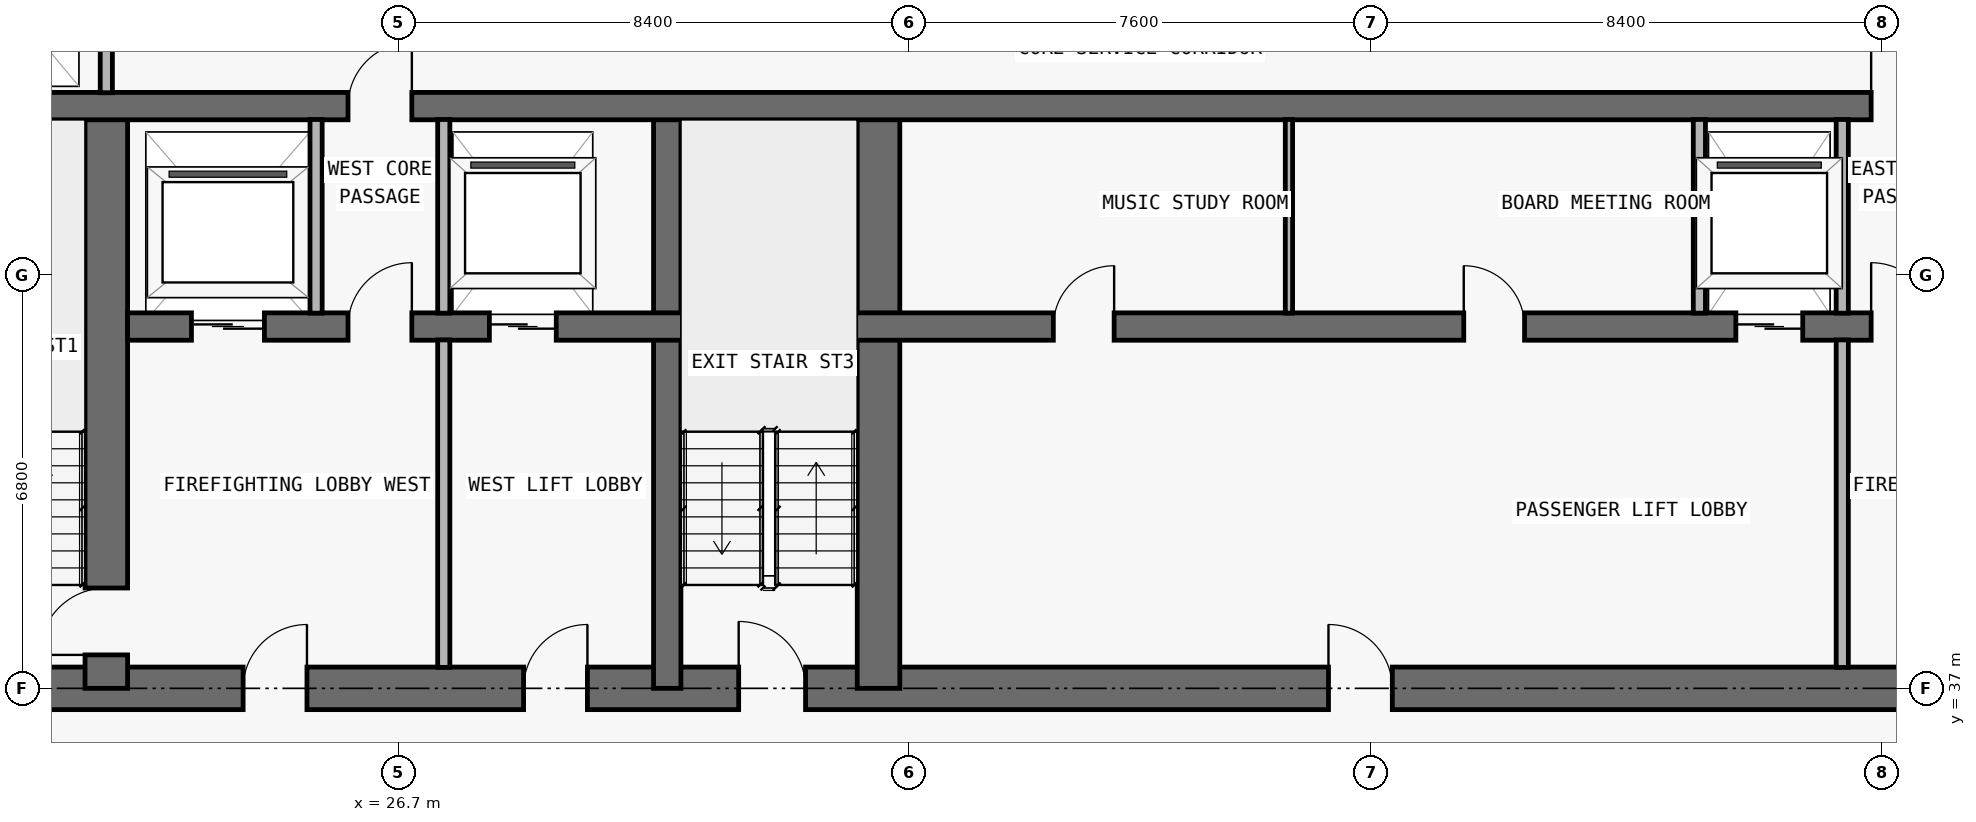
"""IFC4 building model, lengths in metres.
Left out: names, types, materials, properties, quantities, classifications, styles, units other than length and angle.
Written with IfcOpenShell. Run it as: python <this file> out.ifc"""

import sys

from ifc_helpers import new_model, si_unit, direction, frame, frame_2d, origin, place, context, subcontext, project, spatial, rectangle, extrude, element, fill, save


model = new_model("IFC4")
c1 = context("Model", 3, precision=1e-05, world=origin(), true_north=direction((0.0, 1.0)))
c2 = subcontext(c1, "Body", "Model", "MODEL_VIEW")
j1 = project(units=[si_unit("LENGTHUNIT", "METRE"), si_unit("PLANEANGLEUNIT", "RADIAN")], contexts=[c1])
p1 = place(None, origin())
s1 = spatial("IfcSite", under=j1, at=p1, CompositionType="ELEMENT")
p2 = place(p1, origin())
s2 = spatial("IfcBuilding", under=s1, at=p2, CompositionType="ELEMENT")
p3 = place(p2, frame((0.0, 0.0, 188.4)))
s3 = spatial("IfcBuildingStorey", under=s2, at=p3, CompositionType="ELEMENT", Elevation=188.4)
p4 = place(p3, frame((17.95, 37.0, 0.0), z_axis=(0.0, 0.0, 1.0), x_axis=(1.0, 0.0, 0.0)))
e1 = element("IfcWall", 1, at=p4, inside=s3, PredefinedType="SHEAR", context=c2, shape_type="SweptSolid", body=[
    extrude(rectangle(XDim=41.9, YDim=0.7, at=frame_2d((20.95, 0.0))), origin(), (0.0, 0.0, 1.0), 3.05),
])
p5 = place(p4, frame((14.35, 0.0, 0.0)))
e2 = element("IfcOpeningElement", 2, at=p5, cuts=e1, PredefinedType="OPENING", context=c2, shape_type="SweptSolid", body=[
    extrude(rectangle(XDim=1.1, YDim=2.15, at=frame_2d((0.55, 1.075))), frame((0.0, 0.36, 0.0), z_axis=(0.0, -1.0, 0.0), x_axis=(1.0, 0.0, 0.0)), (0.0, 0.0, 1.0), 0.72),
])
p6 = place(p4, frame((6.2, 0.0, 0.0)))
e3 = element("IfcOpeningElement", 3, at=p6, cuts=e1, PredefinedType="OPENING", context=c2, shape_type="SweptSolid", body=[
    extrude(rectangle(XDim=1.05, YDim=2.15, at=frame_2d((0.525, 1.075))), frame((0.0, 0.36, 0.0), z_axis=(0.0, -1.0, 0.0), x_axis=(1.0, 0.0, 0.0)), (0.0, 0.0, 1.0), 0.72),
])
p7 = place(p4, frame((34.7, 0.0, 0.0)))
e4 = element("IfcOpeningElement", 4, at=p7, cuts=e1, PredefinedType="OPENING", context=c2, shape_type="SweptSolid", body=[
    extrude(rectangle(XDim=1.05, YDim=2.15, at=frame_2d((0.525, 1.075))), frame((0.0, 0.36, 0.0), z_axis=(0.0, -1.0, 0.0), x_axis=(1.0, 0.0, 0.0)), (0.0, 0.0, 1.0), 0.72),
])
p8 = place(p4, frame((10.812, 0.0, 0.0)))
e5 = element("IfcOpeningElement", 5, at=p8, cuts=e1, PredefinedType="OPENING", context=c2, shape_type="SweptSolid", body=[
    extrude(rectangle(XDim=1.05, YDim=2.15, at=frame_2d((0.525, 1.075))), frame((0.0, 0.36, 0.0), z_axis=(0.0, -1.0, 0.0), x_axis=(1.0, 0.0, 0.0)), (0.0, 0.0, 1.0), 0.72),
])
p9 = place(p4, frame((24.05, 0.0, 0.0)))
e6 = element("IfcOpeningElement", 6, at=p9, cuts=e1, PredefinedType="OPENING", context=c2, shape_type="SweptSolid", body=[
    extrude(rectangle(XDim=1.05, YDim=2.15, at=frame_2d((0.525, 1.075))), frame((0.0, 0.36, 0.0), z_axis=(0.0, -1.0, 0.0), x_axis=(1.0, 0.0, 0.0)), (0.0, 0.0, 1.0), 0.72),
])
p10 = place(p3, frame((21.9, 37.0, 0.0), z_axis=(0.0, 0.0, 1.0), x_axis=(0.0, 1.0, 0.0)))
e7 = element("IfcWall", 7, at=p10, inside=s3, PredefinedType="SHEAR", context=c2, shape_type="SweptSolid", body=[
    extrude(rectangle(XDim=9.575, YDim=0.7, at=frame_2d((4.788, 0.0))), origin(), (0.0, 0.0, 1.0), 3.05),
])
p11 = place(p10, frame((0.55, 0.0, 0.0)))
e8 = element("IfcOpeningElement", 8, at=p11, cuts=e7, PredefinedType="OPENING", context=c2, shape_type="SweptSolid", body=[
    extrude(rectangle(XDim=1.1, YDim=2.15, at=frame_2d((0.55, 1.075))), frame((0.0, 0.36, 0.0), z_axis=(0.0, -1.0, 0.0), x_axis=(1.0, 0.0, 0.0)), (0.0, 0.0, 1.0), 0.72),
])
p12 = place(p3, frame((31.125, 37.0, 0.0), z_axis=(0.0, 0.0, 1.0), x_axis=(0.0, 1.0, 0.0)))
e9 = element("IfcWall", 9, at=p12, inside=s3, PredefinedType="SHEAR", context=c2, shape_type="SweptSolid", body=[
    extrude(rectangle(XDim=9.575, YDim=0.45, at=frame_2d((4.788, 0.0))), origin(), (0.0, 0.0, 1.0), 3.05),
])
p13 = place(p3, frame((34.6, 37.0, 0.0), z_axis=(0.0, 0.0, 1.0), x_axis=(0.0, 1.0, 0.0)))
e10 = element("IfcWall", 10, at=p13, inside=s3, PredefinedType="SHEAR", context=c2, shape_type="SweptSolid", body=[
    extrude(rectangle(XDim=9.575, YDim=0.7, at=frame_2d((4.788, 0.0))), origin(), (0.0, 0.0, 1.0), 3.05),
])
p14 = place(p3, frame((22.25, 42.95, 0.0), z_axis=(0.0, 0.0, 1.0), x_axis=(1.0, 0.0, 0.0)))
e11 = element("IfcWall", 11, at=p14, inside=s3, PredefinedType="SHEAR", context=c2, shape_type="SweptSolid", body=[
    extrude(rectangle(XDim=33.3, YDim=0.45, at=frame_2d((16.65, 0.0))), origin(), (0.0, 0.0, 1.0), 3.05),
])
p15 = place(p14, frame((1.05, 0.0, 0.0)))
e12 = element("IfcOpeningElement", 12, at=p15, cuts=e11, PredefinedType="OPENING", context=c2, shape_type="SweptSolid", body=[
    extrude(rectangle(XDim=1.2, YDim=2.2, at=frame_2d((0.6, 1.1))), frame((0.0, 0.235, 0.0), z_axis=(0.0, -1.0, 0.0), x_axis=(1.0, 0.0, 0.0)), (0.0, 0.0, 1.0), 0.47),
])
p16 = place(p14, frame((31.05, 0.0, 0.0)))
e13 = element("IfcOpeningElement", 13, at=p16, cuts=e11, PredefinedType="OPENING", context=c2, shape_type="SweptSolid", body=[
    extrude(rectangle(XDim=1.2, YDim=2.2, at=frame_2d((0.6, 1.1))), frame((0.0, 0.235, 0.0), z_axis=(0.0, -1.0, 0.0), x_axis=(1.0, 0.0, 0.0)), (0.0, 0.0, 1.0), 0.47),
])
p17 = place(p14, frame((26.45, 0.0, 0.0)))
e14 = element("IfcOpeningElement", 14, at=p17, cuts=e11, PredefinedType="OPENING", context=c2, shape_type="SweptSolid", body=[
    extrude(rectangle(XDim=1.1, YDim=2.2, at=frame_2d((0.55, 1.1))), frame((0.0, 0.235, 0.0), z_axis=(0.0, -1.0, 0.0), x_axis=(1.0, 0.0, 0.0)), (0.0, 0.0, 1.0), 0.47),
])
p18 = place(p14, frame((5.95, 0.0, 0.0)))
e15 = element("IfcOpeningElement", 15, at=p18, cuts=e11, PredefinedType="OPENING", context=c2, shape_type="SweptSolid", body=[
    extrude(rectangle(XDim=1.1, YDim=2.2, at=frame_2d((0.55, 1.1))), frame((0.0, 0.235, 0.0), z_axis=(0.0, -1.0, 0.0), x_axis=(1.0, 0.0, 0.0)), (0.0, 0.0, 1.0), 0.47),
])
p19 = place(p14, frame((3.625, 0.0, 0.0)))
e16 = element("IfcOpeningElement", 16, at=p19, cuts=e11, PredefinedType="OPENING", context=c2, shape_type="SweptSolid", body=[
    extrude(rectangle(XDim=1.05, YDim=2.15, at=frame_2d((0.525, 1.075))), frame((0.0, 0.235, 0.0), z_axis=(0.0, -1.0, 0.0), x_axis=(1.0, 0.0, 0.0)), (0.0, 0.0, 1.0), 0.47),
])
p20 = place(p14, frame((28.675, 0.0, 0.0)))
e17 = element("IfcOpeningElement", 17, at=p20, cuts=e11, PredefinedType="OPENING", context=c2, shape_type="SweptSolid", body=[
    extrude(rectangle(XDim=1.05, YDim=2.15, at=frame_2d((0.525, 1.075))), frame((0.0, 0.235, 0.0), z_axis=(0.0, -1.0, 0.0), x_axis=(1.0, 0.0, 0.0)), (0.0, 0.0, 1.0), 0.47),
])
p21 = place(p14, frame((15.225, 0.0, 0.0)))
e18 = element("IfcOpeningElement", 18, at=p21, cuts=e11, PredefinedType="OPENING", context=c2, shape_type="SweptSolid", body=[
    extrude(rectangle(XDim=1.0, YDim=2.2, at=frame_2d((0.5, 1.1))), frame((0.0, 0.235, 0.0), z_axis=(0.0, -1.0, 0.0), x_axis=(1.0, 0.0, 0.0)), (0.0, 0.0, 1.0), 0.47),
])
p22 = place(p14, frame((21.975, 0.0, 0.0)))
e19 = element("IfcOpeningElement", 19, at=p22, cuts=e11, PredefinedType="OPENING", context=c2, shape_type="SweptSolid", body=[
    extrude(rectangle(XDim=1.0, YDim=2.2, at=frame_2d((0.5, 1.1))), frame((0.0, 0.235, 0.0), z_axis=(0.0, -1.0, 0.0), x_axis=(1.0, 0.0, 0.0)), (0.0, 0.0, 1.0), 0.47),
])
p23 = place(p3, frame((18.3, 46.575, 0.0), z_axis=(0.0, 0.0, 1.0), x_axis=(1.0, 0.0, 0.0)))
e20 = element("IfcWall", 20, at=p23, inside=s3, PredefinedType="SHEAR", context=c2, shape_type="SweptSolid", body=[
    extrude(rectangle(XDim=41.2, YDim=0.45, at=frame_2d((20.6, 0.0))), origin(), (0.0, 0.0, 1.0), 3.05),
])
p24 = place(p23, frame((7.575, 0.0, 0.0)))
e21 = element("IfcOpeningElement", 21, at=p24, cuts=e20, PredefinedType="OPENING", context=c2, shape_type="SweptSolid", body=[
    extrude(rectangle(XDim=1.05, YDim=2.15, at=frame_2d((0.525, 1.075))), frame((0.0, 0.235, 0.0), z_axis=(0.0, -1.0, 0.0), x_axis=(1.0, 0.0, 0.0)), (0.0, 0.0, 1.0), 0.47),
])
p25 = place(p23, frame((32.625, 0.0, 0.0)))
e22 = element("IfcOpeningElement", 22, at=p25, cuts=e20, PredefinedType="OPENING", context=c2, shape_type="SweptSolid", body=[
    extrude(rectangle(XDim=1.05, YDim=2.15, at=frame_2d((0.525, 1.075))), frame((0.0, 0.235, 0.0), z_axis=(0.0, -1.0, 0.0), x_axis=(1.0, 0.0, 0.0)), (0.0, 0.0, 1.0), 0.47),
])
p26 = place(p3, frame((21.9, 46.795, 0.0), z_axis=(0.0, 0.0, 1.0), x_axis=(0.0, 1.0, 0.0)))
e23 = element("IfcWall", 23, at=p26, inside=s3, PredefinedType="PARTITIONING", context=c2, shape_type="SweptSolid", body=[
    extrude(rectangle(XDim=3.16, YDim=0.2, at=frame_2d((1.58, 0.0))), origin(), (0.0, 0.0, 1.0), 3.05),
])
p27 = place(p3, frame((25.35, 43.17, 0.0), z_axis=(0.0, 0.0, 1.0), x_axis=(0.0, 1.0, 0.0)))
e24 = element("IfcWall", 24, at=p27, inside=s3, PredefinedType="PARTITIONING", context=c2, shape_type="SweptSolid", body=[
    extrude(rectangle(XDim=3.185, YDim=0.2, at=frame_2d((1.593, 0.0))), origin(), (0.0, 0.0, 1.0), 3.05),
])
p28 = place(p3, frame((27.45, 37.345, 0.0), z_axis=(0.0, 0.0, 1.0), x_axis=(0.0, 1.0, 0.0)))
e25 = element("IfcWall", 25, at=p28, inside=s3, PredefinedType="PARTITIONING", context=c2, shape_type="SweptSolid", body=[
    extrude(rectangle(XDim=5.385, YDim=0.2, at=frame_2d((2.692, 0.0))), origin(), (0.0, 0.0, 1.0), 3.05),
])
p29 = place(p3, frame((27.45, 43.17, 0.0), z_axis=(0.0, 0.0, 1.0), x_axis=(0.0, 1.0, 0.0)))
e26 = element("IfcWall", 26, at=p29, inside=s3, PredefinedType="PARTITIONING", context=c2, shape_type="SweptSolid", body=[
    extrude(rectangle(XDim=3.185, YDim=0.2, at=frame_2d((1.593, 0.0))), origin(), (0.0, 0.0, 1.0), 3.05),
])
p30 = place(p3, frame((41.35, 43.17, 0.0), z_axis=(0.0, 0.0, 1.0), x_axis=(0.0, 1.0, 0.0)))
e27 = element("IfcWall", 27, at=p30, inside=s3, PredefinedType="PARTITIONING", context=c2, shape_type="SweptSolid", body=[
    extrude(rectangle(XDim=3.185, YDim=0.12, at=frame_2d((1.593, 0.0))), origin(), (0.0, 0.0, 1.0), 3.05),
])
p31 = place(p3, frame((48.1, 43.17, 0.0), z_axis=(0.0, 0.0, 1.0), x_axis=(0.0, 1.0, 0.0)))
e28 = element("IfcWall", 28, at=p31, inside=s3, PredefinedType="PARTITIONING", context=c2, shape_type="SweptSolid", body=[
    extrude(rectangle(XDim=3.185, YDim=0.2, at=frame_2d((1.593, 0.0))), origin(), (0.0, 0.0, 1.0), 3.05),
])
p32 = place(p3, frame((50.45, 37.345, 0.0), z_axis=(0.0, 0.0, 1.0), x_axis=(0.0, 1.0, 0.0)))
e29 = element("IfcWall", 29, at=p32, inside=s3, PredefinedType="PARTITIONING", context=c2, shape_type="SweptSolid", body=[
    extrude(rectangle(XDim=5.385, YDim=0.2, at=frame_2d((2.692, 0.0))), origin(), (0.0, 0.0, 1.0), 3.05),
])
p33 = place(p3, frame((50.45, 43.17, 0.0), z_axis=(0.0, 0.0, 1.0), x_axis=(0.0, 1.0, 0.0)))
e30 = element("IfcWall", 30, at=p33, inside=s3, PredefinedType="PARTITIONING", context=c2, shape_type="SweptSolid", body=[
    extrude(rectangle(XDim=3.185, YDim=0.2, at=frame_2d((1.593, 0.0))), origin(), (0.0, 0.0, 1.0), 3.05),
])
p34 = place(p15, origin())
e31 = element("IfcDoor", 31, at=p34, inside=s3, OperationType="DOUBLE_DOOR_SLIDING", PredefinedType="DOOR", context=c2, shape_type="SweptSolid", body=[
    extrude(rectangle(XDim=1.2, YDim=2.2, at=frame_2d((0.6, 1.1))), frame((0.0, 0.025, 0.0), z_axis=(0.0, -1.0, 0.0), x_axis=(1.0, 0.0, 0.0)), (0.0, 0.0, 1.0), 0.05),
])
fill(e12, e31)
p35 = place(p17, origin())
e32 = element("IfcDoor", 32, at=p35, inside=s3, OperationType="DOUBLE_DOOR_SLIDING", PredefinedType="DOOR", context=c2, shape_type="SweptSolid", body=[
    extrude(rectangle(XDim=1.1, YDim=2.2, at=frame_2d((0.55, 1.1))), frame((0.0, 0.025, 0.0), z_axis=(0.0, -1.0, 0.0), x_axis=(1.0, 0.0, 0.0)), (0.0, 0.0, 1.0), 0.05),
])
fill(e14, e32)
p36 = place(p18, origin())
e33 = element("IfcDoor", 33, at=p36, inside=s3, OperationType="DOUBLE_DOOR_SLIDING", PredefinedType="DOOR", context=c2, shape_type="SweptSolid", body=[
    extrude(rectangle(XDim=1.1, YDim=2.2, at=frame_2d((0.55, 1.1))), frame((0.0, 0.025, 0.0), z_axis=(0.0, -1.0, 0.0), x_axis=(1.0, 0.0, 0.0)), (0.0, 0.0, 1.0), 0.05),
])
fill(e15, e33)
p37 = place(p5, origin())
e34 = element("IfcDoor", 34, at=p37, inside=s3, OperationType="SINGLE_SWING_LEFT", PredefinedType="DOOR", context=c2, shape_type="SweptSolid", body=[
    extrude(rectangle(XDim=1.1, YDim=2.15, at=frame_2d((0.55, 1.075))), frame((0.0, 0.025, 0.0), z_axis=(0.0, -1.0, 0.0), x_axis=(1.0, 0.0, 0.0)), (0.0, 0.0, 1.0), 0.05),
])
fill(e2, e34)
p38 = place(p6, origin())
e35 = element("IfcDoor", 35, at=p38, inside=s3, OperationType="SINGLE_SWING_RIGHT", PredefinedType="DOOR", context=c2, shape_type="SweptSolid", body=[
    extrude(rectangle(XDim=1.05, YDim=2.15, at=frame_2d((0.525, 1.075))), frame((0.0, 0.025, 0.0), z_axis=(0.0, -1.0, 0.0), x_axis=(1.0, 0.0, 0.0)), (0.0, 0.0, 1.0), 0.05),
])
fill(e3, e35)
p39 = place(p11, origin())
e36 = element("IfcDoor", 36, at=p39, inside=s3, OperationType="SINGLE_SWING_LEFT", PredefinedType="DOOR", context=c2, shape_type="SweptSolid", body=[
    extrude(rectangle(XDim=1.1, YDim=2.15, at=frame_2d((0.55, 1.075))), frame((0.0, 0.025, 0.0), z_axis=(0.0, -1.0, 0.0), x_axis=(1.0, 0.0, 0.0)), (0.0, 0.0, 1.0), 0.05),
])
fill(e8, e36)
p40 = place(p19, origin())
e37 = element("IfcDoor", 37, at=p40, inside=s3, OperationType="SINGLE_SWING_RIGHT", PredefinedType="DOOR", context=c2, shape_type="SweptSolid", body=[
    extrude(rectangle(XDim=1.05, YDim=2.15, at=frame_2d((0.525, 1.075))), frame((0.0, 0.025, 0.0), z_axis=(0.0, -1.0, 0.0), x_axis=(1.0, 0.0, 0.0)), (0.0, 0.0, 1.0), 0.05),
])
fill(e16, e37)
p41 = place(p20, origin())
e38 = element("IfcDoor", 38, at=p41, inside=s3, OperationType="SINGLE_SWING_LEFT", PredefinedType="DOOR", context=c2, shape_type="SweptSolid", body=[
    extrude(rectangle(XDim=1.05, YDim=2.15, at=frame_2d((0.525, 1.075))), frame((0.0, 0.025, 0.0), z_axis=(0.0, -1.0, 0.0), x_axis=(1.0, 0.0, 0.0)), (0.0, 0.0, 1.0), 0.05),
])
fill(e17, e38)
p42 = place(p8, origin())
e39 = element("IfcDoor", 39, at=p42, inside=s3, OperationType="SINGLE_SWING_RIGHT", PredefinedType="DOOR", context=c2, shape_type="SweptSolid", body=[
    extrude(rectangle(XDim=1.05, YDim=2.15, at=frame_2d((0.525, 1.075))), frame((0.0, 0.025, 0.0), z_axis=(0.0, -1.0, 0.0), x_axis=(1.0, 0.0, 0.0)), (0.0, 0.0, 1.0), 0.05),
])
fill(e5, e39)
p43 = place(p9, origin())
e40 = element("IfcDoor", 40, at=p43, inside=s3, OperationType="SINGLE_SWING_LEFT", PredefinedType="DOOR", context=c2, shape_type="SweptSolid", body=[
    extrude(rectangle(XDim=1.05, YDim=2.15, at=frame_2d((0.525, 1.075))), frame((0.0, 0.025, 0.0), z_axis=(0.0, -1.0, 0.0), x_axis=(1.0, 0.0, 0.0)), (0.0, 0.0, 1.0), 0.05),
])
fill(e6, e40)
p44 = place(p21, origin())
e41 = element("IfcDoor", 41, at=p44, inside=s3, OperationType="SINGLE_SWING_RIGHT", PredefinedType="DOOR", context=c2, shape_type="SweptSolid", body=[
    extrude(rectangle(XDim=1.0, YDim=2.2, at=frame_2d((0.5, 1.1))), frame((0.0, 0.025, 0.0), z_axis=(0.0, -1.0, 0.0), x_axis=(1.0, 0.0, 0.0)), (0.0, 0.0, 1.0), 0.05),
])
fill(e18, e41)
p45 = place(p22, origin())
e42 = element("IfcDoor", 42, at=p45, inside=s3, OperationType="SINGLE_SWING_LEFT", PredefinedType="DOOR", context=c2, shape_type="SweptSolid", body=[
    extrude(rectangle(XDim=1.0, YDim=2.2, at=frame_2d((0.5, 1.1))), frame((0.0, 0.025, 0.0), z_axis=(0.0, -1.0, 0.0), x_axis=(1.0, 0.0, 0.0)), (0.0, 0.0, 1.0), 0.05),
])
fill(e19, e42)
p46 = place(p24, origin())
e43 = element("IfcDoor", 43, at=p46, inside=s3, OperationType="SINGLE_SWING_RIGHT", PredefinedType="DOOR", context=c2, shape_type="SweptSolid", body=[
    extrude(rectangle(XDim=1.05, YDim=2.15, at=frame_2d((0.525, 1.075))), frame((0.0, 0.025, 0.0), z_axis=(0.0, -1.0, 0.0), x_axis=(1.0, 0.0, 0.0)), (0.0, 0.0, 1.0), 0.05),
])
fill(e21, e43)
p47 = place(p25, origin())
e44 = element("IfcDoor", 44, at=p47, inside=s3, OperationType="SINGLE_SWING_LEFT", PredefinedType="DOOR", context=c2, shape_type="SweptSolid", body=[
    extrude(rectangle(XDim=1.05, YDim=2.15, at=frame_2d((0.525, 1.075))), frame((0.0, 0.025, 0.0), z_axis=(0.0, -1.0, 0.0), x_axis=(1.0, 0.0, 0.0)), (0.0, 0.0, 1.0), 0.05),
])
fill(e22, e44)
save(model, sys.argv[1])
